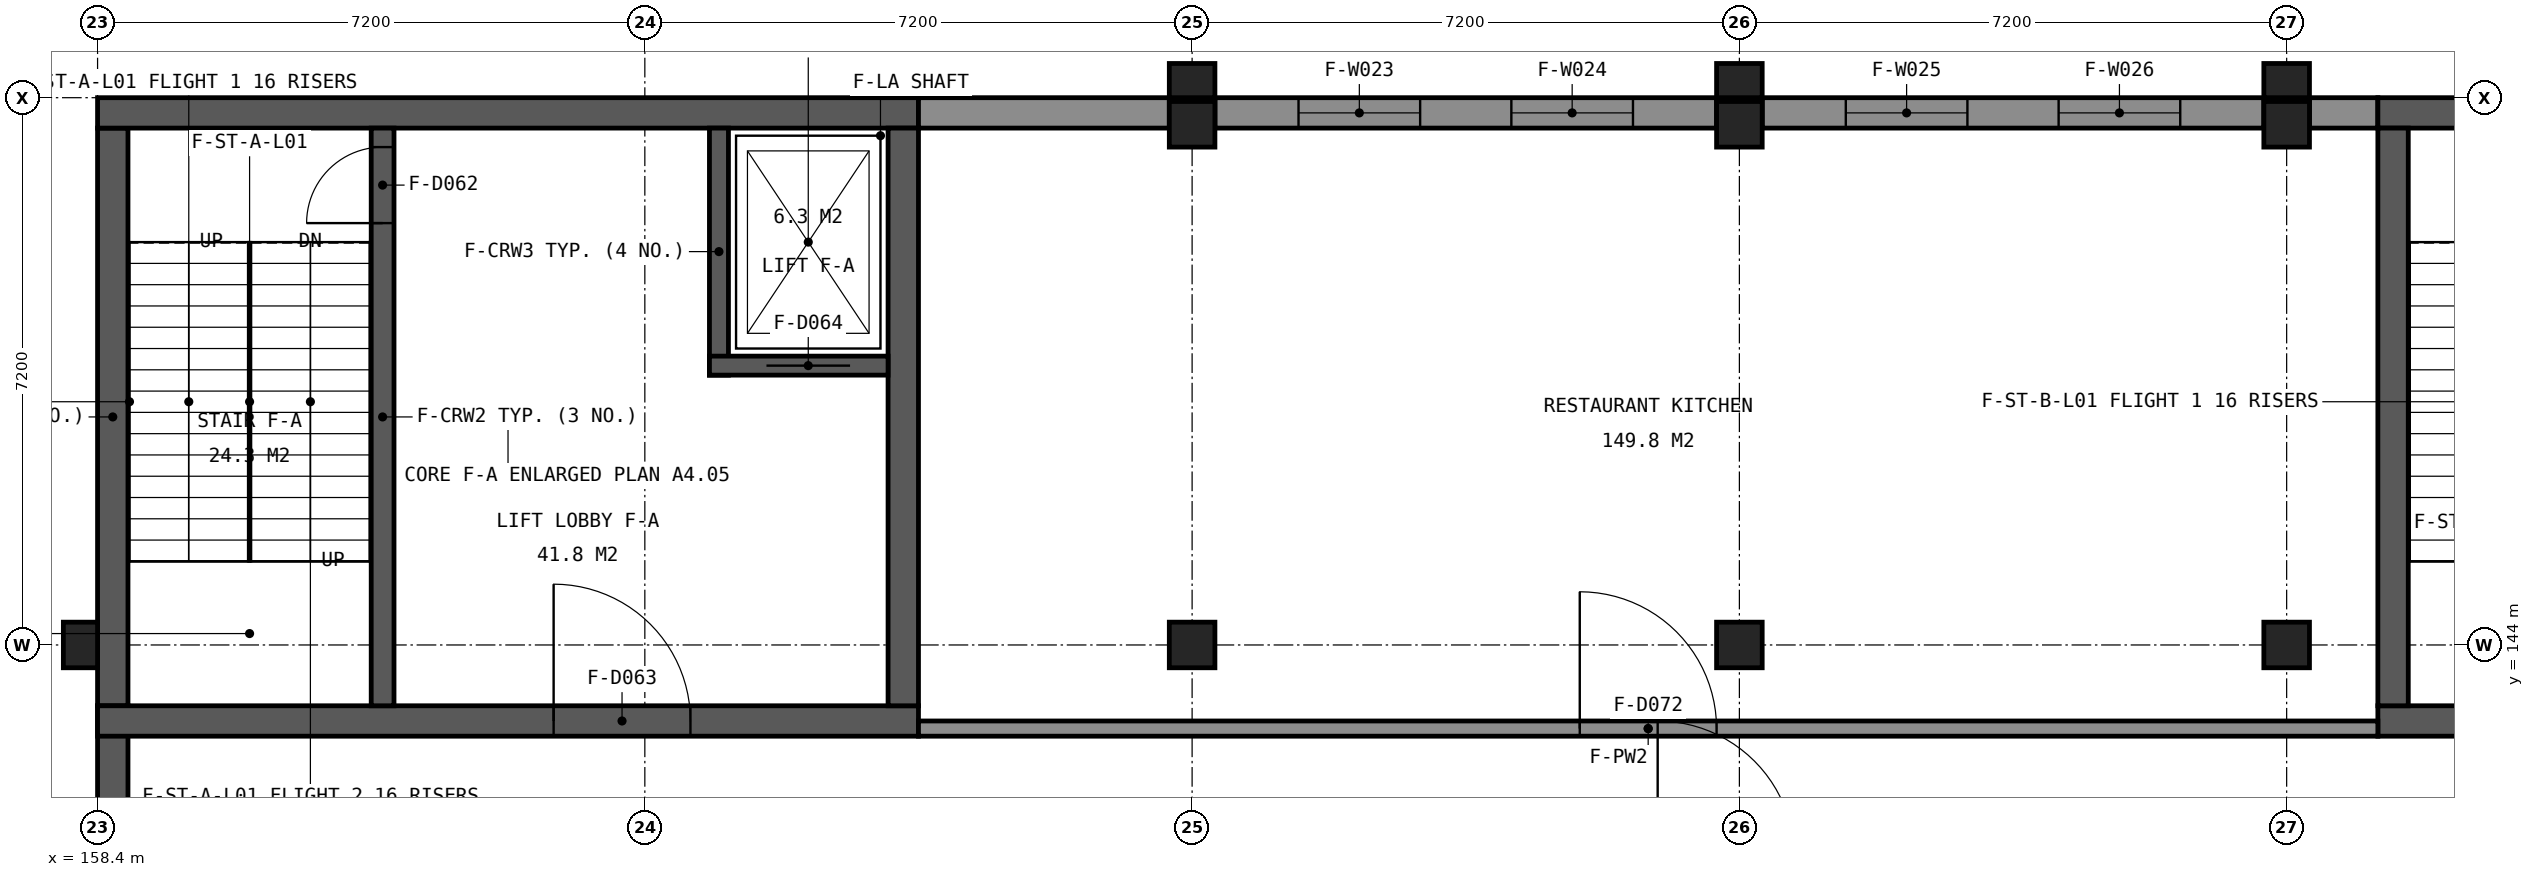
"""IFC4 building model, lengths in metres.
Left out: names, types, materials, properties, quantities, classifications, styles, units other than length and angle.
Written with IfcOpenShell. Run it as: python <this file> out.ifc"""

import sys

from ifc_helpers import new_model, si_unit, direction, frame, frame_2d, origin, origin_2d, place, context, subcontext, project, spatial, rectangle, extrude, element, fill, save


model = new_model("IFC4")
c1 = context("Model", 3, precision=1e-05, world=origin(), true_north=direction((0.0, 1.0)))
c2 = subcontext(c1, "Body", "Model", "MODEL_VIEW")
j1 = project(units=[si_unit("LENGTHUNIT", "METRE"), si_unit("PLANEANGLEUNIT", "RADIAN")], contexts=[c1])
p1 = place(None, origin())
s1 = spatial("IfcSite", under=j1, at=p1, CompositionType="ELEMENT")
p2 = place(p1, origin())
s2 = spatial("IfcBuilding", under=s1, at=p2, CompositionType="ELEMENT")
p3 = place(p2, frame((0.0, 0.0, 9.6)))
s3 = spatial("IfcBuildingStorey", under=s2, at=p3, CompositionType="ELEMENT", Elevation=9.6)
for number, where, z_axis, x_axis in (
    (1, (172.8, 144.0, 0.0), (0.0, 0.0, 1.0), (1.0, 0.0, 0.0)),
    (2, (180.0, 144.0, 0.0), (0.0, 0.0, 1.0), (1.0, 0.0, 0.0)),
    (3, (187.2, 144.0, 0.0), (0.0, 0.0, 1.0), (1.0, 0.0, 0.0)),
    (4, (172.8, 150.85, 0.0), (0.0, 0.0, 1.0), (1.0, 0.0, 0.0)),
    (5, (180.0, 150.85, 0.0), (0.0, 0.0, 1.0), (1.0, 0.0, 0.0)),
    (6, (187.2, 150.85, 0.0), (0.0, 0.0, 1.0), (1.0, 0.0, 0.0)),
):
    element("IfcColumn", number, at=place(p3, frame(where, z_axis=z_axis, x_axis=x_axis)), inside=s3, PredefinedType="COLUMN", context=c2, shape_type="SweptSolid", body=[
        extrude(rectangle(XDim=0.6, YDim=0.6, at=origin_2d()), origin(), (0.0, 0.0, 1.0), 4.8),
    ])
p4 = place(p3, frame((158.6, 137.1, 0.0), z_axis=(0.0, 0.0, 1.0), x_axis=(0.0, 1.0, 0.0)))
e7 = element("IfcWall", 7, at=p4, inside=s3, PredefinedType="SHEAR", context=c2, shape_type="SweptSolid", body=[
    extrude(rectangle(XDim=6.1, YDim=0.4, at=frame_2d((3.05, 0.0))), origin(), (0.0, 0.0, 1.0), 3.95),
])
p5 = place(p4, frame((0.85, 0.0, 0.8)))
e8 = element("IfcOpeningElement", 8, at=p5, cuts=e7, PredefinedType="OPENING", context=c2, shape_type="SweptSolid", body=[
    extrude(rectangle(XDim=1.6, YDim=3.1, at=frame_2d((0.8, 1.55))), frame((0.0, 0.21, 0.0), z_axis=(0.0, -1.0, 0.0), x_axis=(1.0, 0.0, 0.0)), (0.0, 0.0, 1.0), 0.42),
])
p6 = place(p3, frame((158.6, 143.2, 0.0), z_axis=(0.0, 0.0, 1.0), x_axis=(0.0, 1.0, 0.0)))
e9 = element("IfcWall", 9, at=p6, inside=s3, PredefinedType="SHEAR", context=c2, shape_type="SweptSolid", body=[
    extrude(rectangle(XDim=7.6, YDim=0.4, at=frame_2d((3.8, 0.0))), origin(), (0.0, 0.0, 1.0), 4.55),
])
p7 = place(p3, frame((158.4, 151.0, 0.0), z_axis=(0.0, 0.0, 1.0), x_axis=(1.0, 0.0, 0.0)))
e10 = element("IfcWall", 10, at=p7, inside=s3, PredefinedType="SHEAR", context=c2, shape_type="SweptSolid", body=[
    extrude(rectangle(XDim=10.8, YDim=0.4, at=frame_2d((5.4, 0.0))), origin(), (0.0, 0.0, 1.0), 4.55),
])
p8 = place(p3, frame((169.2, 151.0, 0.0), z_axis=(0.0, 0.0, 1.0), x_axis=(1.0, 0.0, 0.0)))
e11 = element("IfcWall", 11, at=p8, inside=s3, PredefinedType="SOLIDWALL", context=c2, shape_type="SweptSolid", body=[
    extrude(rectangle(XDim=3.3, YDim=0.4, at=frame_2d((1.65, 0.0))), origin(), (0.0, 0.0, 1.0), 3.95),
])
p9 = place(p3, frame((173.1, 151.0, 0.0), z_axis=(0.0, 0.0, 1.0), x_axis=(1.0, 0.0, 0.0)))
e12 = element("IfcWall", 12, at=p9, inside=s3, PredefinedType="SOLIDWALL", context=c2, shape_type="SweptSolid", body=[
    extrude(rectangle(XDim=6.6, YDim=0.4, at=frame_2d((3.3, 0.0))), origin(), (0.0, 0.0, 1.0), 3.95),
])
p10 = place(p9, frame((1.1, 0.0, 0.8)))
e13 = element("IfcOpeningElement", 13, at=p10, cuts=e12, PredefinedType="OPENING", context=c2, shape_type="SweptSolid", body=[
    extrude(rectangle(XDim=1.6, YDim=3.1, at=frame_2d((0.8, 1.55))), frame((0.0, 0.21, 0.0), z_axis=(0.0, -1.0, 0.0), x_axis=(1.0, 0.0, 0.0)), (0.0, 0.0, 1.0), 0.42),
])
p11 = place(p9, frame((3.9, 0.0, 0.8)))
e14 = element("IfcOpeningElement", 14, at=p11, cuts=e12, PredefinedType="OPENING", context=c2, shape_type="SweptSolid", body=[
    extrude(rectangle(XDim=1.6, YDim=3.1, at=frame_2d((0.8, 1.55))), frame((0.0, 0.21, 0.0), z_axis=(0.0, -1.0, 0.0), x_axis=(1.0, 0.0, 0.0)), (0.0, 0.0, 1.0), 0.42),
])
p12 = place(p3, frame((180.3, 151.0, 0.0), z_axis=(0.0, 0.0, 1.0), x_axis=(1.0, 0.0, 0.0)))
e15 = element("IfcWall", 15, at=p12, inside=s3, PredefinedType="SOLIDWALL", context=c2, shape_type="SweptSolid", body=[
    extrude(rectangle(XDim=6.6, YDim=0.4, at=frame_2d((3.3, 0.0))), origin(), (0.0, 0.0, 1.0), 3.95),
])
p13 = place(p12, frame((1.1, 0.0, 0.8)))
e16 = element("IfcOpeningElement", 16, at=p13, cuts=e15, PredefinedType="OPENING", context=c2, shape_type="SweptSolid", body=[
    extrude(rectangle(XDim=1.6, YDim=3.1, at=frame_2d((0.8, 1.55))), frame((0.0, 0.21, 0.0), z_axis=(0.0, -1.0, 0.0), x_axis=(1.0, 0.0, 0.0)), (0.0, 0.0, 1.0), 0.42),
])
p14 = place(p12, frame((3.9, 0.0, 0.8)))
e17 = element("IfcOpeningElement", 17, at=p14, cuts=e15, PredefinedType="OPENING", context=c2, shape_type="SweptSolid", body=[
    extrude(rectangle(XDim=1.6, YDim=3.1, at=frame_2d((0.8, 1.55))), frame((0.0, 0.21, 0.0), z_axis=(0.0, -1.0, 0.0), x_axis=(1.0, 0.0, 0.0)), (0.0, 0.0, 1.0), 0.42),
])
p15 = place(p3, frame((187.5, 151.0, 0.0), z_axis=(0.0, 0.0, 1.0), x_axis=(1.0, 0.0, 0.0)))
e18 = element("IfcWall", 18, at=p15, inside=s3, PredefinedType="SOLIDWALL", context=c2, shape_type="SweptSolid", body=[
    extrude(rectangle(XDim=0.9, YDim=0.4, at=frame_2d((0.45, 0.0))), origin(), (0.0, 0.0, 1.0), 3.95),
])
p16 = place(p3, frame((188.4, 151.0, 0.0), z_axis=(0.0, 0.0, 1.0), x_axis=(1.0, 0.0, 0.0)))
e19 = element("IfcWall", 19, at=p16, inside=s3, PredefinedType="SHEAR", context=c2, shape_type="SweptSolid", body=[
    extrude(rectangle(XDim=10.8, YDim=0.4, at=frame_2d((5.4, 0.0))), origin(), (0.0, 0.0, 1.0), 4.55),
])
p17 = place(p3, frame((158.4, 143.0, 0.0), z_axis=(0.0, 0.0, 1.0), x_axis=(1.0, 0.0, 0.0)))
e20 = element("IfcWall", 20, at=p17, inside=s3, PredefinedType="SHEAR", context=c2, shape_type="SweptSolid", body=[
    extrude(rectangle(XDim=10.8, YDim=0.4, at=frame_2d((5.4, 0.0))), origin(), (0.0, 0.0, 1.0), 4.55),
])
p18 = place(p17, frame((6.0, 0.0, 0.0)))
e21 = element("IfcOpeningElement", 21, at=p18, cuts=e20, PredefinedType="OPENING", context=c2, shape_type="SweptSolid", body=[
    extrude(rectangle(XDim=1.8, YDim=2.1, at=frame_2d((0.9, 1.05))), frame((0.0, 0.21, 0.0), z_axis=(0.0, -1.0, 0.0), x_axis=(1.0, 0.0, 0.0)), (0.0, 0.0, 1.0), 0.42),
])
p19 = place(p3, frame((169.0, 143.2, 0.0), z_axis=(0.0, 0.0, 1.0), x_axis=(0.0, 1.0, 0.0)))
e22 = element("IfcWall", 22, at=p19, inside=s3, PredefinedType="SHEAR", context=c2, shape_type="SweptSolid", body=[
    extrude(rectangle(XDim=7.6, YDim=0.4, at=frame_2d((3.8, 0.0))), origin(), (0.0, 0.0, 1.0), 4.55),
])
p20 = place(p3, frame((162.15, 143.2, 0.0), z_axis=(0.0, 0.0, 1.0), x_axis=(0.0, 1.0, 0.0)))
e23 = element("IfcWall", 23, at=p20, inside=s3, PredefinedType="SHEAR", context=c2, shape_type="SweptSolid", body=[
    extrude(rectangle(XDim=7.6, YDim=0.3, at=frame_2d((3.8, 0.0))), origin(), (0.0, 0.0, 1.0), 4.55),
])
p21 = place(p20, frame((6.35, 0.0, 0.0)))
e24 = element("IfcOpeningElement", 24, at=p21, cuts=e23, PredefinedType="OPENING", context=c2, shape_type="SweptSolid", body=[
    extrude(rectangle(XDim=1.0, YDim=2.1, at=frame_2d((0.5, 1.05))), frame((0.0, 0.16, 0.0), z_axis=(0.0, -1.0, 0.0), x_axis=(1.0, 0.0, 0.0)), (0.0, 0.0, 1.0), 0.32),
])
p22 = place(p3, frame((166.575, 147.55, 0.0), z_axis=(0.0, 0.0, 1.0), x_axis=(0.0, 1.0, 0.0)))
e25 = element("IfcWall", 25, at=p22, inside=s3, PredefinedType="SHEAR", context=c2, shape_type="SweptSolid", body=[
    extrude(rectangle(XDim=3.25, YDim=0.25, at=frame_2d((1.625, 0.0))), origin(), (0.0, 0.0, 1.0), 4.55),
])
p23 = place(p3, frame((166.45, 147.675, 0.0), z_axis=(0.0, 0.0, 1.0), x_axis=(1.0, 0.0, 0.0)))
e26 = element("IfcWall", 26, at=p23, inside=s3, PredefinedType="SHEAR", context=c2, shape_type="SweptSolid", body=[
    extrude(rectangle(XDim=2.35, YDim=0.25, at=frame_2d((1.175, 0.0))), origin(), (0.0, 0.0, 1.0), 4.55),
])
p24 = place(p23, frame((0.75, 0.0, 0.0)))
e27 = element("IfcOpeningElement", 27, at=p24, cuts=e26, PredefinedType="OPENING", context=c2, shape_type="SweptSolid", body=[
    extrude(rectangle(XDim=1.1, YDim=2.1, at=frame_2d((0.55, 1.05))), frame((0.0, 0.135, 0.0), z_axis=(0.0, -1.0, 0.0), x_axis=(1.0, 0.0, 0.0)), (0.0, 0.0, 1.0), 0.27),
])
p25 = place(p3, frame((188.4, 143.0, 0.0), z_axis=(0.0, 0.0, 1.0), x_axis=(1.0, 0.0, 0.0)))
e28 = element("IfcWall", 28, at=p25, inside=s3, PredefinedType="SHEAR", context=c2, shape_type="SweptSolid", body=[
    extrude(rectangle(XDim=10.8, YDim=0.4, at=frame_2d((5.4, 0.0))), origin(), (0.0, 0.0, 1.0), 4.55),
])
p26 = place(p25, frame((6.0, 0.0, 0.0)))
e29 = element("IfcOpeningElement", 29, at=p26, cuts=e28, PredefinedType="OPENING", context=c2, shape_type="SweptSolid", body=[
    extrude(rectangle(XDim=1.8, YDim=2.1, at=frame_2d((0.9, 1.05))), frame((0.0, 0.21, 0.0), z_axis=(0.0, -1.0, 0.0), x_axis=(1.0, 0.0, 0.0)), (0.0, 0.0, 1.0), 0.42),
])
p27 = place(p3, frame((188.6, 143.2, 0.0), z_axis=(0.0, 0.0, 1.0), x_axis=(0.0, 1.0, 0.0)))
e30 = element("IfcWall", 30, at=p27, inside=s3, PredefinedType="SHEAR", context=c2, shape_type="SweptSolid", body=[
    extrude(rectangle(XDim=7.6, YDim=0.4, at=frame_2d((3.8, 0.0))), origin(), (0.0, 0.0, 1.0), 4.55),
])
for number, where, z_axis, x_axis in (
    (31, (172.8, 151.425, 0.0), (0.0, 0.0, 1.0), (1.0, 0.0, 0.0)),
    (32, (180.0, 151.425, 0.0), (0.0, 0.0, 1.0), (1.0, 0.0, 0.0)),
    (33, (187.2, 151.425, 0.0), (0.0, 0.0, 1.0), (1.0, 0.0, 0.0)),
    (34, (158.175, 144.0, 0.0), (0.0, 0.0, 1.0), (0.0, 1.0, 0.0)),
):
    element("IfcColumn", number, at=place(p3, frame(where, z_axis=z_axis, x_axis=x_axis)), inside=s3, PredefinedType="PILASTER", context=c2, shape_type="SweptSolid", body=[
        extrude(rectangle(XDim=0.6, YDim=0.45, at=origin_2d()), origin(), (0.0, 0.0, 1.0), 4.8),
    ])
p28 = place(p3, frame((169.2, 142.9, 0.0), z_axis=(0.0, 0.0, 1.0), x_axis=(1.0, 0.0, 0.0)))
e35 = element("IfcWall", 35, at=p28, inside=s3, PredefinedType="PARTITIONING", context=c2, shape_type="SweptSolid", body=[
    extrude(rectangle(XDim=19.2, YDim=0.2, at=frame_2d((9.6, 0.0))), origin(), (0.0, 0.0, 1.0), 3.95),
])
p29 = place(p28, frame((8.7, 0.0, 0.0)))
e36 = element("IfcOpeningElement", 36, at=p29, cuts=e35, PredefinedType="OPENING", context=c2, shape_type="SweptSolid", body=[
    extrude(rectangle(XDim=1.8, YDim=2.1, at=frame_2d((0.9, 1.05))), frame((0.0, 0.11, 0.0), z_axis=(0.0, -1.0, 0.0), x_axis=(1.0, 0.0, 0.0)), (0.0, 0.0, 1.0), 0.22),
])
p30 = place(p10, origin())
e37 = element("IfcWindow", 37, at=p30, inside=s3, PartitioningType="SINGLE_PANEL", PredefinedType="WINDOW", context=c2, shape_type="SweptSolid", body=[
    extrude(rectangle(XDim=1.6, YDim=3.1, at=frame_2d((0.8, 1.55))), frame((0.0, -0.09, 0.0), z_axis=(0.0, -1.0, 0.0), x_axis=(1.0, 0.0, 0.0)), (0.0, 0.0, 1.0), 0.06),
])
fill(e13, e37)
p31 = place(p11, origin())
e38 = element("IfcWindow", 38, at=p31, inside=s3, PartitioningType="SINGLE_PANEL", PredefinedType="WINDOW", context=c2, shape_type="SweptSolid", body=[
    extrude(rectangle(XDim=1.6, YDim=3.1, at=frame_2d((0.8, 1.55))), frame((0.0, -0.09, 0.0), z_axis=(0.0, -1.0, 0.0), x_axis=(1.0, 0.0, 0.0)), (0.0, 0.0, 1.0), 0.06),
])
fill(e14, e38)
p32 = place(p13, origin())
e39 = element("IfcWindow", 39, at=p32, inside=s3, PartitioningType="SINGLE_PANEL", PredefinedType="WINDOW", context=c2, shape_type="SweptSolid", body=[
    extrude(rectangle(XDim=1.6, YDim=3.1, at=frame_2d((0.8, 1.55))), frame((0.0, -0.09, 0.0), z_axis=(0.0, -1.0, 0.0), x_axis=(1.0, 0.0, 0.0)), (0.0, 0.0, 1.0), 0.06),
])
fill(e16, e39)
p33 = place(p14, origin())
e40 = element("IfcWindow", 40, at=p33, inside=s3, PartitioningType="SINGLE_PANEL", PredefinedType="WINDOW", context=c2, shape_type="SweptSolid", body=[
    extrude(rectangle(XDim=1.6, YDim=3.1, at=frame_2d((0.8, 1.55))), frame((0.0, -0.09, 0.0), z_axis=(0.0, -1.0, 0.0), x_axis=(1.0, 0.0, 0.0)), (0.0, 0.0, 1.0), 0.06),
])
fill(e17, e40)
p34 = place(p21, origin())
e41 = element("IfcDoor", 41, at=p34, inside=s3, OperationType="NOTDEFINED", PredefinedType="DOOR", context=c2, shape_type="SweptSolid", body=[
    extrude(rectangle(XDim=1.0, YDim=2.1, at=frame_2d((0.5, 1.05))), frame((0.0, 0.025, 0.0), z_axis=(0.0, -1.0, 0.0), x_axis=(1.0, 0.0, 0.0)), (0.0, 0.0, 1.0), 0.05),
])
fill(e24, e41)
p35 = place(p18, origin())
e42 = element("IfcDoor", 42, at=p35, inside=s3, OperationType="NOTDEFINED", PredefinedType="DOOR", context=c2, shape_type="SweptSolid", body=[
    extrude(rectangle(XDim=1.8, YDim=2.1, at=frame_2d((0.9, 1.05))), frame((0.0, 0.025, 0.0), z_axis=(0.0, -1.0, 0.0), x_axis=(1.0, 0.0, 0.0)), (0.0, 0.0, 1.0), 0.05),
])
fill(e21, e42)
p36 = place(p24, origin())
e43 = element("IfcDoor", 43, at=p36, inside=s3, OperationType="SLIDING_TO_LEFT", PredefinedType="DOOR", context=c2, shape_type="SweptSolid", body=[
    extrude(rectangle(XDim=1.1, YDim=2.1, at=frame_2d((0.55, 1.05))), frame((0.0, 0.025, 0.0), z_axis=(0.0, -1.0, 0.0), x_axis=(1.0, 0.0, 0.0)), (0.0, 0.0, 1.0), 0.05),
])
fill(e27, e43)
p37 = place(p29, origin())
e44 = element("IfcDoor", 44, at=p37, inside=s3, OperationType="NOTDEFINED", PredefinedType="DOOR", context=c2, shape_type="SweptSolid", body=[
    extrude(rectangle(XDim=1.8, YDim=2.1, at=frame_2d((0.9, 1.05))), frame((0.0, 0.025, 0.0), z_axis=(0.0, -1.0, 0.0), x_axis=(1.0, 0.0, 0.0)), (0.0, 0.0, 1.0), 0.05),
])
fill(e36, e44)
save(model, sys.argv[1])
